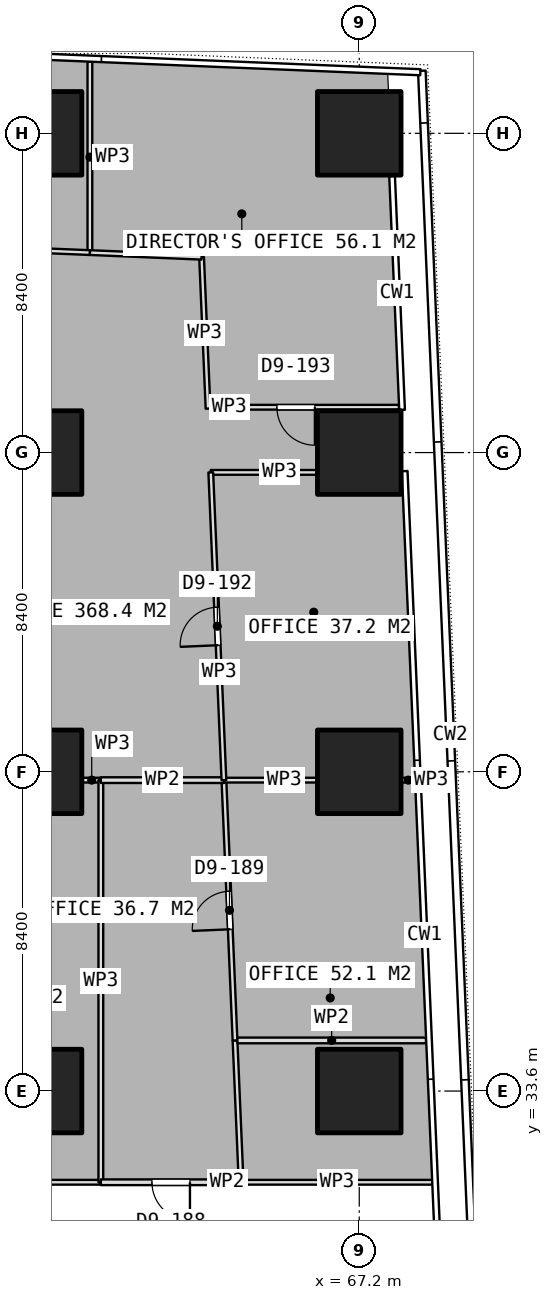
"""IFC4 building model, lengths in metres.
Left out: names, types, materials, properties, quantities, classifications, styles, units other than length and angle.
Written with IfcOpenShell. Run it as: python <this file> out.ifc"""

import sys

from ifc_helpers import new_model, si_unit, direction, frame, frame_2d, origin, origin_2d, place, context, subcontext, project, spatial, rectangle, extrude, element, fill, save


model = new_model("IFC4")
c1 = context("Model", 3, precision=1e-05, world=origin(), true_north=direction((0.0, 1.0)))
c2 = subcontext(c1, "Body", "Model", "MODEL_VIEW")
j1 = project(units=[si_unit("LENGTHUNIT", "METRE"), si_unit("PLANEANGLEUNIT", "RADIAN")], contexts=[c1])
p1 = place(None, origin())
s1 = spatial("IfcSite", under=j1, at=p1, CompositionType="ELEMENT")
p2 = place(p1, origin())
s2 = spatial("IfcBuilding", under=s1, at=p2, CompositionType="ELEMENT")
p3 = place(p2, frame((0.0, 0.0, 59.15)))
s3 = spatial("IfcBuildingStorey", under=s2, at=p3, CompositionType="ELEMENT", Elevation=59.15)
for number, where, z_axis, x_axis in (
    (1, (58.8, 33.6, 0.0), (0.0, 0.0, 1.0), (1.0, 0.0, 0.0)),
    (2, (58.8, 42.0, 0.0), (0.0, 0.0, 1.0), (1.0, 0.0, 0.0)),
    (3, (58.8, 50.4, 0.0), (0.0, 0.0, 1.0), (1.0, 0.0, 0.0)),
    (4, (58.8, 58.8, 0.0), (0.0, 0.0, 1.0), (1.0, 0.0, 0.0)),
    (5, (67.2, 33.6, 0.0), (0.0, 0.0, 1.0), (1.0, 0.0, 0.0)),
    (6, (67.2, 42.0, 0.0), (0.0, 0.0, 1.0), (1.0, 0.0, 0.0)),
    (7, (67.2, 50.4, 0.0), (0.0, 0.0, 1.0), (1.0, 0.0, 0.0)),
    (8, (67.2, 58.8, 0.0), (0.0, 0.0, 1.0), (1.0, 0.0, 0.0)),
):
    element("IfcColumn", number, at=place(p3, frame(where, z_axis=z_axis, x_axis=x_axis)), inside=s3, PredefinedType="COLUMN", context=c2, shape_type="SweptSolid", body=[
        extrude(rectangle(XDim=2.2, YDim=2.2, at=origin_2d()), origin(), (0.0, 0.0, 1.0), 3.75),
    ])
p4 = place(p3, frame((69.145, 31.2, 0.0), z_axis=(0.0, 0.0, 1.0), x_axis=(-1.0, 0.0, 0.0)))
e9 = element("IfcWall", 9, at=p4, inside=s3, PredefinedType="PARTITIONING", context=c2, shape_type="SweptSolid", body=[
    extrude(rectangle(XDim=5.054, YDim=0.125, at=frame_2d((2.527, 0.0))), origin(), (0.0, 0.0, 1.0), 3.5),
])
p5 = place(p3, frame((64.091, 31.2, 0.0), z_axis=(0.0, 0.0, 1.0), x_axis=(-0.042898031351, 0.999079455752, 0.0)))
e10 = element("IfcWall", 10, at=p5, inside=s3, PredefinedType="PARTITIONING", context=c2, shape_type="SweptSolid", body=[
    extrude(rectangle(XDim=3.733, YDim=0.125, at=frame_2d((1.867, 0.0))), origin(), (0.0, 0.0, 1.0), 3.5),
])
p6 = place(p3, frame((63.931, 34.93, 0.0), z_axis=(0.0, 0.0, 1.0), x_axis=(-0.042581257085, 0.999093006954, 0.0)))
e11 = element("IfcWall", 11, at=p6, inside=s3, PredefinedType="PARTITIONING", context=c2, shape_type="SweptSolid", body=[
    extrude(rectangle(XDim=6.857, YDim=0.125, at=frame_2d((3.429, 0.0))), origin(), (0.0, 0.0, 1.0), 3.5),
])
p7 = place(p6, frame((2.929, 0.0, 0.0)))
e12 = element("IfcOpeningElement", 12, at=p7, cuts=e11, PredefinedType="OPENING", context=c2, shape_type="SweptSolid", body=[
    extrude(rectangle(XDim=1.0, YDim=2.1, at=frame_2d((0.5, 1.05))), frame((0.0, 0.073, 0.0), z_axis=(0.0, -1.0, 0.0), x_axis=(1.0, 0.0, 0.0)), (0.0, 0.0, 1.0), 0.145),
])
p8 = place(p3, frame((63.639, 41.781, 0.0), z_axis=(0.0, 0.0, 1.0), x_axis=(1.0, 0.0, 0.0)))
e13 = element("IfcWall", 13, at=p8, inside=s3, PredefinedType="PARTITIONING", context=c2, shape_type="SweptSolid", body=[
    extrude(rectangle(XDim=2.441, YDim=0.125, at=frame_2d((1.221, 0.0))), origin(), (0.0, 0.0, 1.0), 3.5),
])
p9 = place(p3, frame((68.32, 41.781, 0.0), z_axis=(0.0, 0.0, 1.0), x_axis=(1.0, 0.0, 0.0)))
e14 = element("IfcWall", 14, at=p9, inside=s3, PredefinedType="PARTITIONING", context=c2, shape_type="SweptSolid", body=[
    extrude(rectangle(XDim=0.343, YDim=0.125, at=frame_2d((0.171, 0.0))), origin(), (0.0, 0.0, 1.0), 3.5),
])
p10 = place(p3, frame((60.4, 31.2, 0.0), z_axis=(0.0, 0.0, 1.0), x_axis=(-1.0, 0.0, 0.0)))
e15 = element("IfcWall", 15, at=p10, inside=s3, PredefinedType="PARTITIONING", context=c2, shape_type="SweptSolid", body=[
    extrude(rectangle(XDim=7.2, YDim=0.125, at=frame_2d((3.6, 0.0))), origin(), (0.0, 0.0, 1.0), 3.5),
])
p11 = place(p3, frame((59.92, 41.781, 0.0), z_axis=(0.0, 0.0, 1.0), x_axis=(1.0, 0.0, 0.0)))
e16 = element("IfcWall", 16, at=p11, inside=s3, PredefinedType="PARTITIONING", context=c2, shape_type="SweptSolid", body=[
    extrude(rectangle(XDim=0.48, YDim=0.125, at=frame_2d((0.24, 0.0))), origin(), (0.0, 0.0, 1.0), 3.5),
])
p12 = place(p3, frame((60.4, 41.781, 0.0), z_axis=(0.0, 0.0, 1.0), x_axis=(0.0, -1.0, 0.0)))
e17 = element("IfcWall", 17, at=p12, inside=s3, PredefinedType="PARTITIONING", context=c2, shape_type="SweptSolid", body=[
    extrude(rectangle(XDim=10.581, YDim=0.125, at=frame_2d((5.291, 0.0))), origin(), (0.0, 0.0, 1.0), 3.5),
])
p13 = place(p3, frame((63.993, 34.932, 0.0), z_axis=(0.0, 0.0, 1.0), x_axis=(1.0, 0.0, 0.0)))
e18 = element("IfcWall", 18, at=p13, inside=s3, PredefinedType="PARTITIONING", context=c2, shape_type="SweptSolid", body=[
    extrude(rectangle(XDim=4.963, YDim=0.15, at=frame_2d((2.481, 0.0))), origin(), (0.0, 0.0, 1.0), 3.5),
])
p14 = place(p3, frame((64.091, 31.2, 0.0), z_axis=(0.0, 0.0, 1.0), x_axis=(-1.0, 0.0, 0.0)))
e19 = element("IfcWall", 19, at=p14, inside=s3, PredefinedType="PARTITIONING", context=c2, shape_type="SweptSolid", body=[
    extrude(rectangle(XDim=3.691, YDim=0.15, at=frame_2d((1.846, 0.0))), origin(), (0.0, 0.0, 1.0), 3.5),
])
p15 = place(p14, frame((1.346, 0.0, 0.0)))
e20 = element("IfcOpeningElement", 20, at=p15, cuts=e19, PredefinedType="OPENING", context=c2, shape_type="SweptSolid", body=[
    extrude(rectangle(XDim=1.0, YDim=2.1, at=frame_2d((0.5, 1.05))), frame((0.0, 0.085, 0.0), z_axis=(0.0, -1.0, 0.0), x_axis=(1.0, 0.0, 0.0)), (0.0, 0.0, 1.0), 0.17),
])
p16 = place(p3, frame((60.4, 41.781, 0.0), z_axis=(0.0, 0.0, 1.0), x_axis=(1.0, 0.0, 0.0)))
e21 = element("IfcWall", 21, at=p16, inside=s3, PredefinedType="PARTITIONING", context=c2, shape_type="SweptSolid", body=[
    extrude(rectangle(XDim=3.239, YDim=0.15, at=frame_2d((1.62, 0.0))), origin(), (0.0, 0.0, 1.0), 3.5),
])
p17 = place(p3, frame((63.293, 49.879, 0.0), z_axis=(0.0, 0.0, 1.0), x_axis=(1.0, 0.0, 0.0)))
e22 = element("IfcWall", 22, at=p17, inside=s3, PredefinedType="PARTITIONING", context=c2, shape_type="SweptSolid", body=[
    extrude(rectangle(XDim=2.787, YDim=0.125, at=frame_2d((1.394, 0.0))), origin(), (0.0, 0.0, 1.0), 3.5),
])
p18 = place(p3, frame((63.639, 41.782, 0.0), z_axis=(0.0, 0.0, 1.0), x_axis=(-0.042686820675, 0.999088502256, 0.0)))
e23 = element("IfcWall", 23, at=p18, inside=s3, PredefinedType="PARTITIONING", context=c2, shape_type="SweptSolid", body=[
    extrude(rectangle(XDim=8.104, YDim=0.125, at=frame_2d((4.052, 0.0))), origin(), (0.0, 0.0, 1.0), 3.5),
])
p19 = place(p18, frame((3.552, 0.0, 0.0)))
e24 = element("IfcOpeningElement", 24, at=p19, cuts=e23, PredefinedType="OPENING", context=c2, shape_type="SweptSolid", body=[
    extrude(rectangle(XDim=1.0, YDim=2.1, at=frame_2d((0.5, 1.05))), frame((0.0, 0.073, 0.0), z_axis=(0.0, -1.0, 0.0), x_axis=(1.0, 0.0, 0.0)), (0.0, 0.0, 1.0), 0.145),
])
p20 = place(p3, frame((60.112, 55.662, 0.0), z_axis=(0.0, 0.0, 1.0), x_axis=(0.0, 1.0, 0.0)))
e25 = element("IfcWall", 25, at=p20, inside=s3, PredefinedType="PARTITIONING", context=c2, shape_type="SweptSolid", body=[
    extrude(rectangle(XDim=5.024, YDim=0.125, at=frame_2d((2.512, 0.0))), origin(), (0.0, 0.0, 1.0), 3.5),
])
p21 = place(p3, frame((68.244, 51.593, 0.0), z_axis=(0.0, 0.0, 1.0), x_axis=(-1.0, 0.0, 0.0)))
e26 = element("IfcWall", 26, at=p21, inside=s3, PredefinedType="PARTITIONING", context=c2, shape_type="SweptSolid", body=[
    extrude(rectangle(XDim=4.962, YDim=0.125, at=frame_2d((2.481, 0.0))), origin(), (0.0, 0.0, 1.0), 3.5),
])
p22 = place(p21, frame((2.211, 0.0, 0.0)))
e27 = element("IfcOpeningElement", 27, at=p22, cuts=e26, PredefinedType="OPENING", context=c2, shape_type="SweptSolid", body=[
    extrude(rectangle(XDim=1.0, YDim=2.1, at=frame_2d((0.5, 1.05))), frame((0.0, 0.073, 0.0), z_axis=(0.0, -1.0, 0.0), x_axis=(1.0, 0.0, 0.0)), (0.0, 0.0, 1.0), 0.145),
])
p23 = place(p3, frame((63.221, 51.557, 0.0), z_axis=(0.0, 0.0, 1.0), x_axis=(-0.042621363321, 0.999091296824, 0.0)))
e28 = element("IfcWall", 28, at=p23, inside=s3, PredefinedType="PARTITIONING", context=c2, shape_type="SweptSolid", body=[
    extrude(rectangle(XDim=3.987, YDim=0.125, at=frame_2d((1.993, 0.0))), origin(), (0.0, 0.0, 1.0), 3.5),
])
p24 = place(p3, frame((63.051, 55.54, 0.0), z_axis=(0.0, 0.0, 1.0), x_axis=(-0.9991385306, 0.041499357476, 0.0)))
e29 = element("IfcWall", 29, at=p24, inside=s3, PredefinedType="PARTITIONING", context=c2, shape_type="SweptSolid", body=[
    extrude(rectangle(XDim=2.941, YDim=0.125, at=frame_2d((1.471, 0.0))), origin(), (0.0, 0.0, 1.0), 3.5),
])
p25 = place(p3, frame((60.111, 55.662, 0.0), z_axis=(0.0, 0.0, 1.0), x_axis=(-0.999153902149, 0.041127604115, 0.0)))
e30 = element("IfcWall", 30, at=p25, inside=s3, PredefinedType="PARTITIONING", context=c2, shape_type="SweptSolid", body=[
    extrude(rectangle(XDim=8.702, YDim=0.125, at=frame_2d((4.351, 0.0))), origin(), (0.0, 0.0, 1.0), 3.5),
])
p26 = place(p25, frame((3.851, 0.0, 0.0)))
e31 = element("IfcOpeningElement", 31, at=p26, cuts=e30, PredefinedType="OPENING", context=c2, shape_type="SweptSolid", body=[
    extrude(rectangle(XDim=1.0, YDim=2.1, at=frame_2d((0.5, 1.05))), frame((0.0, 0.073, 0.0), z_axis=(0.0, -1.0, 0.0), x_axis=(1.0, 0.0, 0.0)), (0.0, 0.0, 1.0), 0.145),
])
p27 = place(p7, origin())
e32 = element("IfcDoor", 32, at=p27, inside=s3, OperationType="SINGLE_SWING_LEFT", PredefinedType="DOOR", context=c2, shape_type="SweptSolid", body=[
    extrude(rectangle(XDim=1.0, YDim=2.1, at=frame_2d((0.5, 1.05))), frame((0.0, 0.025, 0.0), z_axis=(0.0, -1.0, 0.0), x_axis=(1.0, 0.0, 0.0)), (0.0, 0.0, 1.0), 0.05),
])
fill(e12, e32)
p28 = place(p15, origin())
e33 = element("IfcDoor", 33, at=p28, inside=s3, OperationType="SINGLE_SWING_LEFT", PredefinedType="DOOR", context=c2, shape_type="SweptSolid", body=[
    extrude(rectangle(XDim=1.0, YDim=2.1, at=frame_2d((0.5, 1.05))), frame((0.0, 0.025, 0.0), z_axis=(0.0, -1.0, 0.0), x_axis=(1.0, 0.0, 0.0)), (0.0, 0.0, 1.0), 0.05),
])
fill(e20, e33)
p29 = place(p19, origin())
e34 = element("IfcDoor", 34, at=p29, inside=s3, OperationType="SINGLE_SWING_LEFT", PredefinedType="DOOR", context=c2, shape_type="SweptSolid", body=[
    extrude(rectangle(XDim=1.0, YDim=2.1, at=frame_2d((0.5, 1.05))), frame((0.0, 0.025, 0.0), z_axis=(0.0, -1.0, 0.0), x_axis=(1.0, 0.0, 0.0)), (0.0, 0.0, 1.0), 0.05),
])
fill(e24, e34)
p30 = place(p22, origin())
e35 = element("IfcDoor", 35, at=p30, inside=s3, OperationType="SINGLE_SWING_LEFT", PredefinedType="DOOR", context=c2, shape_type="SweptSolid", body=[
    extrude(rectangle(XDim=1.0, YDim=2.1, at=frame_2d((0.5, 1.05))), frame((0.0, 0.025, 0.0), z_axis=(0.0, -1.0, 0.0), x_axis=(1.0, 0.0, 0.0)), (0.0, 0.0, 1.0), 0.05),
])
fill(e27, e35)
save(model, sys.argv[1])
